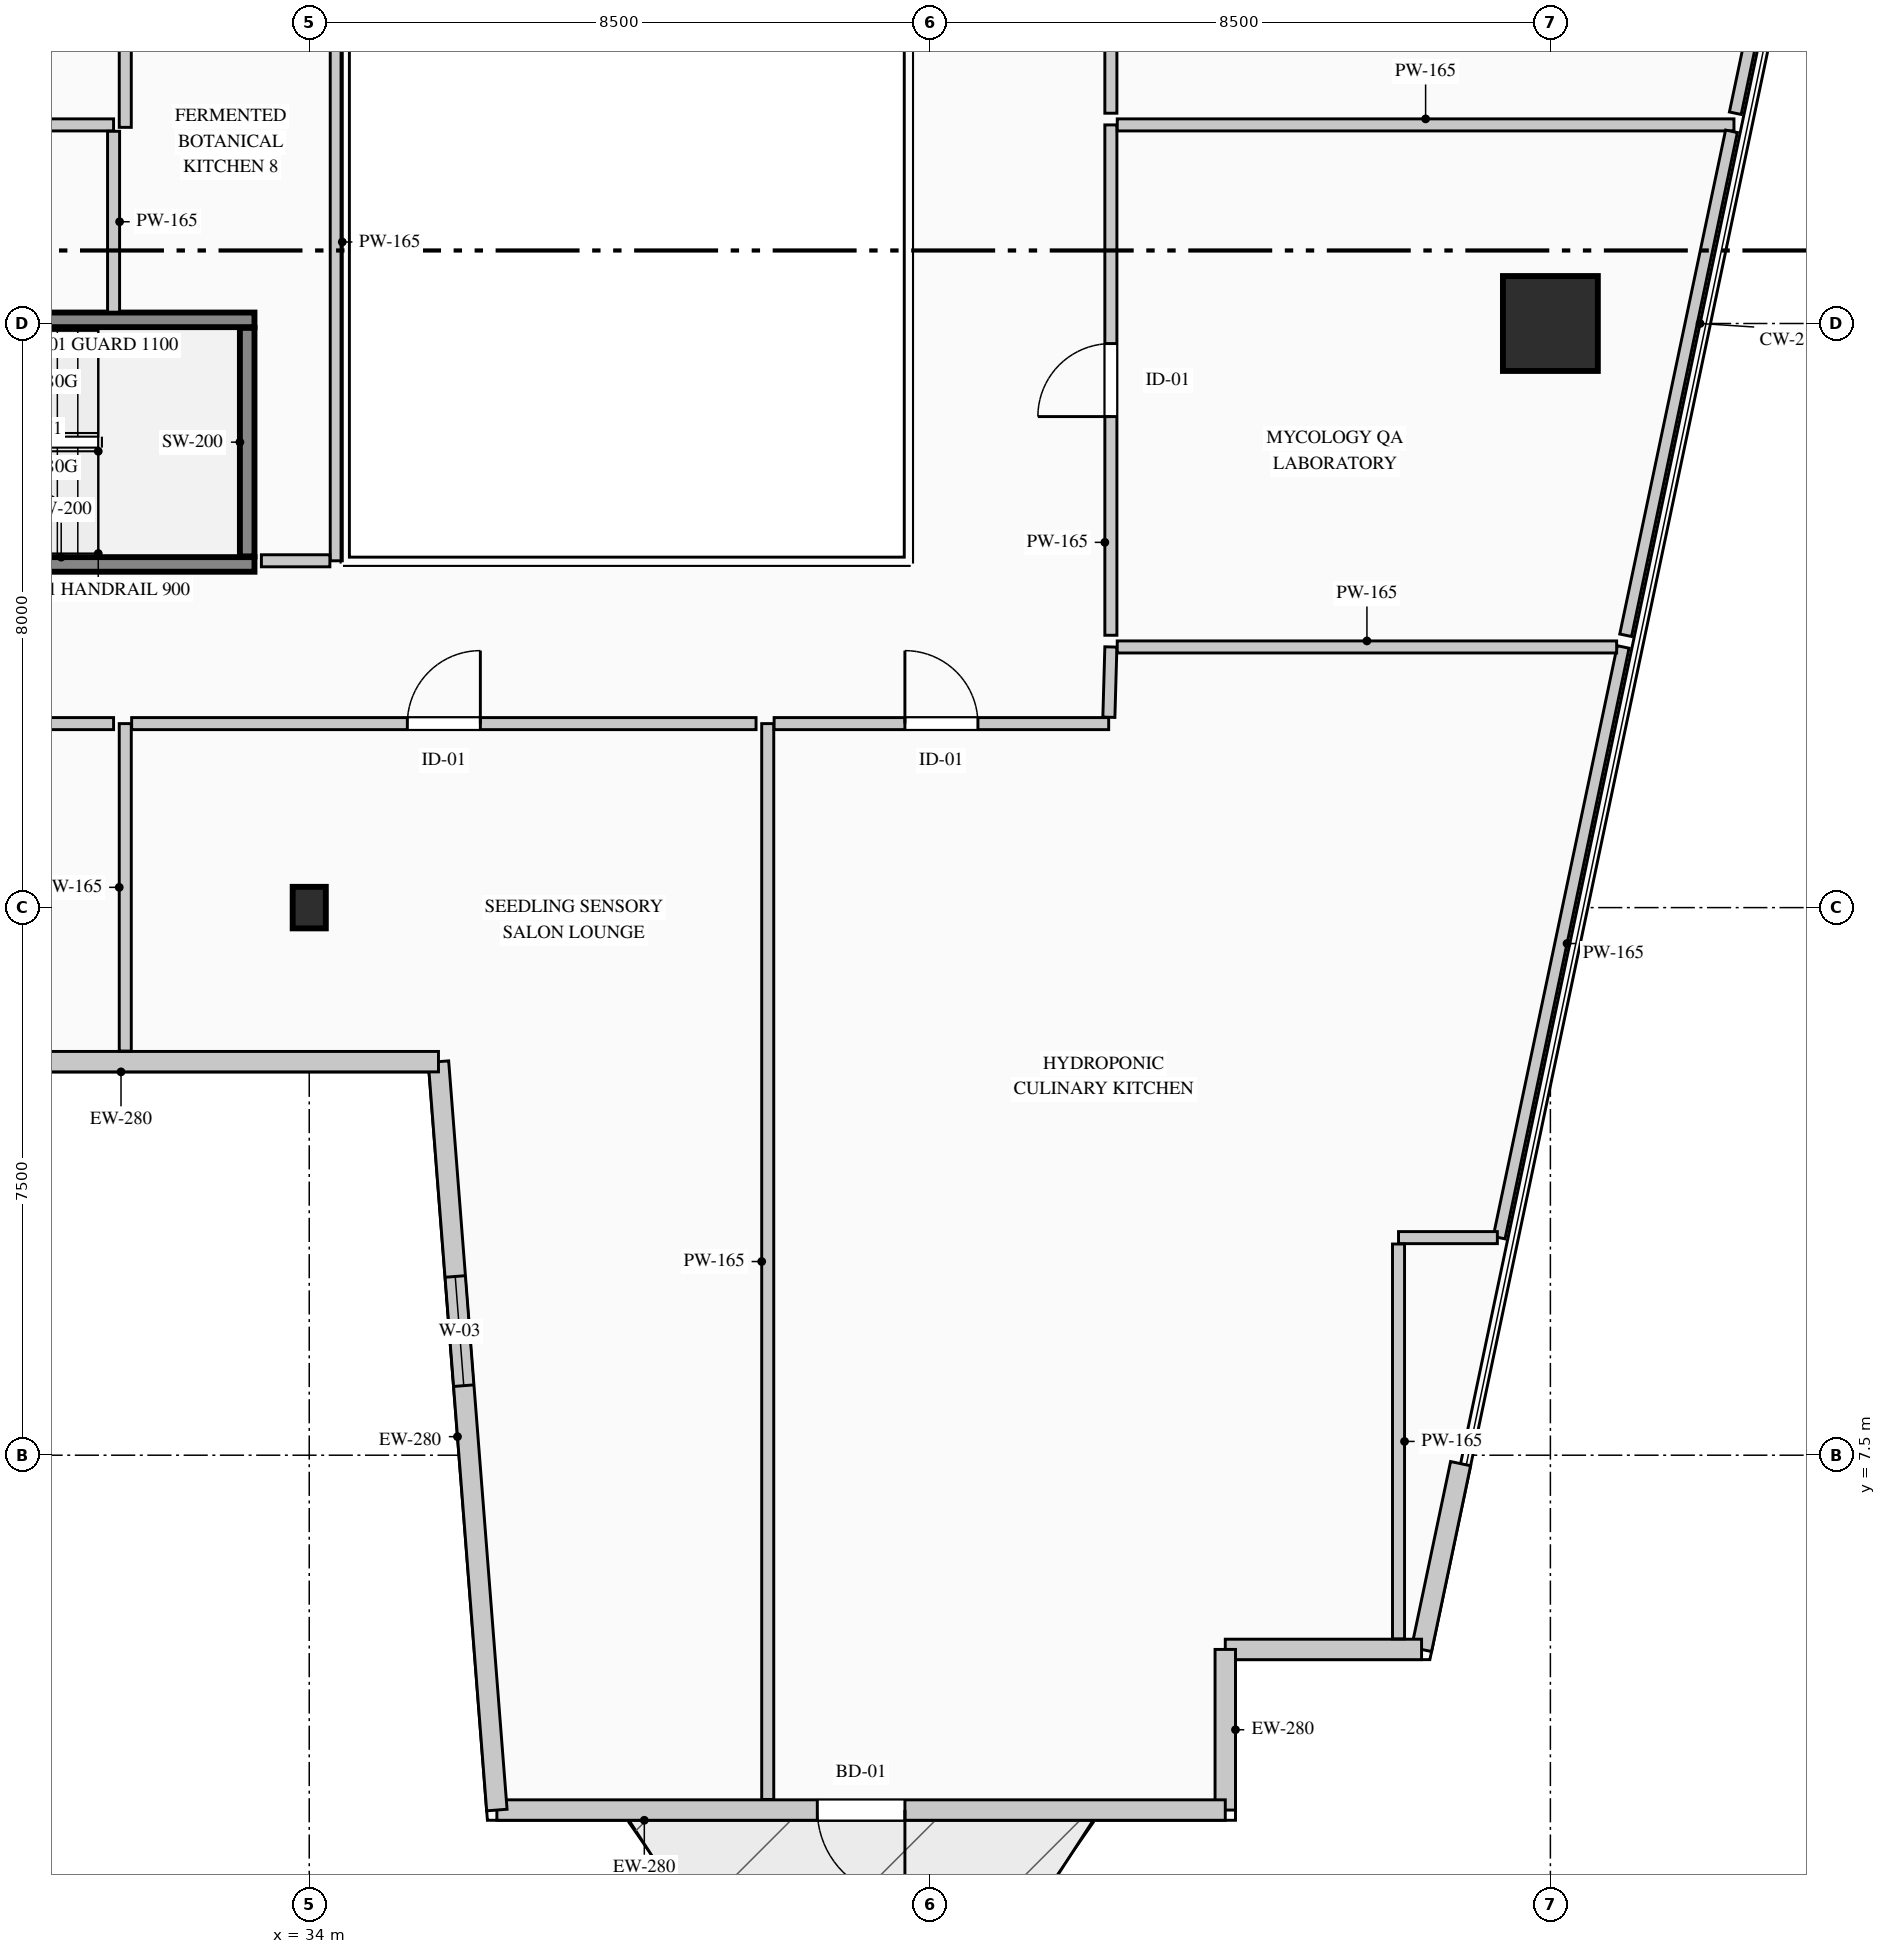
"""IFC4 building model, lengths in metres.
Left out: names, types, materials, properties, quantities, classifications, styles, units other than length and angle.
Written with IfcOpenShell. Run it as: python <this file> out.ifc"""

import sys

from ifc_helpers import new_model, si_unit, direction, frame, frame_2d, origin, origin_2d, place, context, subcontext, project, spatial, rectangle, i_section, extrude, element, fill, save


model = new_model("IFC4")
c1 = context("Model", 3, precision=1e-05, world=origin(), true_north=direction((0.0, 1.0)))
c2 = subcontext(c1, "Body", "Model", "MODEL_VIEW")
j1 = project(units=[si_unit("LENGTHUNIT", "METRE"), si_unit("PLANEANGLEUNIT", "RADIAN")], contexts=[c1])
p1 = place(None, origin())
s1 = spatial("IfcSite", under=j1, at=p1, CompositionType="ELEMENT")
p2 = place(p1, origin())
s2 = spatial("IfcBuilding", under=s1, at=p2, CompositionType="ELEMENT")
p3 = place(p2, frame((0.0, 0.0, 53.4)))
s3 = spatial("IfcBuildingStorey", under=s2, at=p3, CompositionType="ELEMENT", Elevation=53.4)
p4 = place(p3, frame((26.05, 19.7, 0.0), z_axis=(0.0, 0.0, 1.0), x_axis=(1.0, 0.0, 0.0)))
e1 = element("IfcWall", 1, at=p4, inside=s3, PredefinedType="SHEAR", context=c2, shape_type="SweptSolid", body=[
    extrude(rectangle(XDim=7.2, YDim=0.2, at=frame_2d((3.6, 0.0))), origin(), (0.0, 0.0, 1.0), 4.4),
])
p5 = place(p4, frame((0.38, 0.0, 0.0)))
e2 = element("IfcOpeningElement", 2, at=p5, cuts=e1, PredefinedType="OPENING", context=c2, shape_type="SweptSolid", body=[
    extrude(rectangle(XDim=1.15, YDim=2.2, at=frame_2d((0.575, 1.1))), frame((0.0, 0.11, 0.0), z_axis=(0.0, -1.0, 0.0), x_axis=(1.0, 0.0, 0.0)), (0.0, 0.0, 1.0), 0.22),
])
p6 = place(p3, frame((26.05, 23.05, 0.0), z_axis=(0.0, 0.0, 1.0), x_axis=(1.0, 0.0, 0.0)))
e3 = element("IfcWall", 3, at=p6, inside=s3, PredefinedType="SHEAR", context=c2, shape_type="SweptSolid", body=[
    extrude(rectangle(XDim=7.2, YDim=0.2, at=frame_2d((3.6, 0.0))), origin(), (0.0, 0.0, 1.0), 4.4),
])
p7 = place(p3, frame((33.15, 19.81, 0.0), z_axis=(0.0, 0.0, 1.0), x_axis=(0.0, 1.0, 0.0)))
e4 = element("IfcWall", 4, at=p7, inside=s3, PredefinedType="SHEAR", context=c2, shape_type="SweptSolid", body=[
    extrude(rectangle(XDim=3.13, YDim=0.2, at=frame_2d((1.565, 0.0))), origin(), (0.0, 0.0, 1.0), 4.4),
])
p8 = place(p3, frame((34.0, 15.0, 0.0), z_axis=(0.0, 0.0, 1.0), x_axis=(1.0, 0.0, 0.0)))
e5 = element("IfcColumn", 5, at=p8, inside=s3, PredefinedType="COLUMN", context=c2, shape_type="SweptSolid", body=[
    extrude(i_section(OverallWidth=0.454, OverallDepth=0.569, WebThickness=0.078, FlangeThickness=0.08, FilletRadius=0.015, at=origin_2d()), origin(), (0.0, 0.0, 1.0), 4.4),
])
p9 = place(p3, frame((51.0, 23.0, 0.0), z_axis=(0.0, 0.0, 1.0), x_axis=(1.0, 0.0, 0.0)))
e6 = element("IfcColumn", 6, at=p9, inside=s3, PredefinedType="COLUMN", context=c2, shape_type="SweptSolid", body=[
    extrude(rectangle(XDim=1.3, YDim=1.3, at=origin_2d()), origin(), (0.0, 0.0, 1.0), 4.4),
])
p10 = place(p3, frame((49.77, 7.385, 0.0), z_axis=(0.0, 0.0, 1.0), x_axis=(-0.205551409765, -0.978646319128, 0.0)))
e7 = element("IfcWall", 7, at=p10, inside=s3, PredefinedType="STANDARD", context=c2, shape_type="SweptSolid", body=[
    extrude(rectangle(XDim=2.6, YDim=0.28, at=frame_2d((1.3, 0.0))), origin(), (0.0, 0.0, 1.0), 4.1),
])
p11 = place(p3, frame((49.236, 4.84, 0.0), z_axis=(0.0, 0.0, 1.0), x_axis=(-1.0, 0.0, 0.0)))
e8 = element("IfcWall", 8, at=p11, inside=s3, PredefinedType="STANDARD", context=c2, shape_type="SweptSolid", body=[
    extrude(rectangle(XDim=2.688, YDim=0.28, at=frame_2d((1.344, 0.0))), origin(), (0.0, 0.0, 1.0), 4.1),
])
p12 = place(p3, frame((46.547, 4.84, 0.0), z_axis=(0.0, 0.0, 1.0), x_axis=(0.0, -1.0, 0.0)))
e9 = element("IfcWall", 9, at=p12, inside=s3, PredefinedType="STANDARD", context=c2, shape_type="SweptSolid", body=[
    extrude(rectangle(XDim=2.2, YDim=0.28, at=frame_2d((1.1, 0.0))), origin(), (0.0, 0.0, 1.0), 4.1),
])
p13 = place(p3, frame((46.547, 2.64, 0.0), z_axis=(0.0, 0.0, 1.0), x_axis=(-1.0, 0.0, 0.0)))
e10 = element("IfcWall", 10, at=p13, inside=s3, PredefinedType="STANDARD", context=c2, shape_type="SweptSolid", body=[
    extrude(rectangle(XDim=9.977, YDim=0.28, at=frame_2d((4.989, 0.0))), origin(), (0.0, 0.0, 1.0), 4.1),
])
p14 = place(p13, frame((4.388, 0.0, 0.0)))
e11 = element("IfcOpeningElement", 11, at=p14, cuts=e10, PredefinedType="OPENING", context=c2, shape_type="SweptSolid", body=[
    extrude(rectangle(XDim=1.2, YDim=2.2, at=frame_2d((0.6, 1.1))), frame((0.0, 0.15, 0.0), z_axis=(0.0, -1.0, 0.0), x_axis=(1.0, 0.0, 0.0)), (0.0, 0.0, 1.0), 0.3),
])
p15 = place(p3, frame((36.57, 2.64, 0.0), z_axis=(0.0, 0.0, 1.0), x_axis=(-0.077816860153, 0.996967670627, 0.0)))
e12 = element("IfcWall", 12, at=p15, inside=s3, PredefinedType="STANDARD", context=c2, shape_type="SweptSolid", body=[
    extrude(rectangle(XDim=10.281, YDim=0.28, at=frame_2d((5.141, 0.0))), origin(), (0.0, 0.0, 1.0), 4.1),
])
p16 = place(p15, frame((5.83, 0.0, 0.9)))
e13 = element("IfcOpeningElement", 13, at=p16, cuts=e12, PredefinedType="OPENING", context=c2, shape_type="SweptSolid", body=[
    extrude(rectangle(XDim=1.5, YDim=1.8, at=frame_2d((0.75, 0.9))), frame((0.0, 0.15, 0.0), z_axis=(0.0, -1.0, 0.0), x_axis=(1.0, 0.0, 0.0)), (0.0, 0.0, 1.0), 0.3),
])
p17 = place(p3, frame((35.77, 12.89, 0.0), z_axis=(0.0, 0.0, 1.0), x_axis=(-1.0, 0.0, 0.0)))
e14 = element("IfcWall", 14, at=p17, inside=s3, PredefinedType="STANDARD", context=c2, shape_type="SweptSolid", body=[
    extrude(rectangle(XDim=8.697, YDim=0.28, at=frame_2d((4.348, 0.0))), origin(), (0.0, 0.0, 1.0), 4.1),
])
p18 = place(p17, frame((5.511, 0.0, 0.9)))
e15 = element("IfcOpeningElement", 15, at=p18, cuts=e14, PredefinedType="OPENING", context=c2, shape_type="SweptSolid", body=[
    extrude(rectangle(XDim=1.5, YDim=1.8, at=frame_2d((0.75, 0.9))), frame((0.0, 0.15, 0.0), z_axis=(0.0, -1.0, 0.0), x_axis=(1.0, 0.0, 0.0)), (0.0, 0.0, 1.0), 0.3),
])
p19 = place(p3, frame((51.997, 18.57, 0.0), z_axis=(0.0, 0.0, 1.0), x_axis=(-0.205523740085, -0.978652130362, 0.0)))
e16 = element("IfcWall", 16, at=p19, inside=s3, PredefinedType="PARTITIONING", context=c2, shape_type="SweptSolid", body=[
    extrude(rectangle(XDim=8.267, YDim=0.165, at=frame_2d((4.133, 0.0))), origin(), (0.0, 0.0, 1.0), 4.1),
])
p20 = place(p3, frame((50.274, 10.48, 0.0), z_axis=(0.0, 0.0, 1.0), x_axis=(-1.0, 0.0, 0.0)))
e17 = element("IfcWall", 17, at=p20, inside=s3, PredefinedType="PARTITIONING", context=c2, shape_type="SweptSolid", body=[
    extrude(rectangle(XDim=1.354, YDim=0.165, at=frame_2d((0.677, 0.0))), origin(), (0.0, 0.0, 1.0), 4.1),
])
p21 = place(p3, frame((48.92, 10.393, 0.0), z_axis=(0.0, 0.0, 1.0), x_axis=(0.0, -1.0, 0.0)))
e18 = element("IfcWall", 18, at=p21, inside=s3, PredefinedType="PARTITIONING", context=c2, shape_type="SweptSolid", body=[
    extrude(rectangle(XDim=5.407, YDim=0.165, at=frame_2d((2.704, 0.0))), origin(), (0.0, 0.0, 1.0), 4.1),
])
p22 = place(p3, frame((40.28, 2.785, 0.0), z_axis=(0.0, 0.0, 1.0), x_axis=(0.0, 1.0, 0.0)))
e19 = element("IfcWall", 19, at=p22, inside=s3, PredefinedType="PARTITIONING", context=c2, shape_type="SweptSolid", body=[
    extrude(rectangle(XDim=14.735, YDim=0.165, at=frame_2d((7.368, 0.0))), origin(), (0.0, 0.0, 1.0), 4.1),
])
p23 = place(p3, frame((40.367, 17.52, 0.0), z_axis=(0.0, 0.0, 1.0), x_axis=(1.0, 0.0, 0.0)))
e20 = element("IfcWall", 20, at=p23, inside=s3, PredefinedType="PARTITIONING", context=c2, shape_type="SweptSolid", body=[
    extrude(rectangle(XDim=4.583, YDim=0.165, at=frame_2d((2.291, 0.0))), origin(), (0.0, 0.0, 1.0), 4.1),
])
p24 = place(p23, frame((1.791, 0.0, 0.0)))
e21 = element("IfcOpeningElement", 21, at=p24, cuts=e20, PredefinedType="OPENING", context=c2, shape_type="SweptSolid", body=[
    extrude(rectangle(XDim=1.0, YDim=2.15, at=frame_2d((0.5, 1.075))), frame((0.0, 0.093, 0.0), z_axis=(0.0, -1.0, 0.0), x_axis=(1.0, 0.0, 0.0)), (0.0, 0.0, 1.0), 0.185),
])
p25 = place(p3, frame((44.952, 17.607, 0.0), z_axis=(0.0, 0.0, 1.0), x_axis=(0.028624859452, 0.999590224753, 0.0)))
e22 = element("IfcWall", 22, at=p25, inside=s3, PredefinedType="PARTITIONING", context=c2, shape_type="SweptSolid", body=[
    extrude(rectangle(XDim=0.964, YDim=0.165, at=frame_2d((0.482, 0.0))), origin(), (0.0, 0.0, 1.0), 4.1),
])
p26 = place(p3, frame((45.067, 18.57, 0.0), z_axis=(0.0, 0.0, 1.0), x_axis=(1.0, 0.0, 0.0)))
e23 = element("IfcWall", 23, at=p26, inside=s3, PredefinedType="PARTITIONING", context=c2, shape_type="SweptSolid", body=[
    extrude(rectangle(XDim=6.841, YDim=0.165, at=frame_2d((3.42, 0.0))), origin(), (0.0, 0.0, 1.0), 4.1),
])
p27 = place(p3, frame((31.48, 13.035, 0.0), z_axis=(0.0, 0.0, 1.0), x_axis=(0.0, 1.0, 0.0)))
e24 = element("IfcWall", 24, at=p27, inside=s3, PredefinedType="PARTITIONING", context=c2, shape_type="SweptSolid", body=[
    extrude(rectangle(XDim=4.485, YDim=0.165, at=frame_2d((2.243, 0.0))), origin(), (0.0, 0.0, 1.0), 4.1),
])
p28 = place(p3, frame((31.567, 17.52, 0.0), z_axis=(0.0, 0.0, 1.0), x_axis=(1.0, 0.0, 0.0)))
e25 = element("IfcWall", 25, at=p28, inside=s3, PredefinedType="PARTITIONING", context=c2, shape_type="SweptSolid", body=[
    extrude(rectangle(XDim=8.553, YDim=0.165, at=frame_2d((4.276, 0.0))), origin(), (0.0, 0.0, 1.0), 3.685),
])
p29 = place(p28, frame((3.776, 0.0, 0.0)))
e26 = element("IfcOpeningElement", 26, at=p29, cuts=e25, PredefinedType="OPENING", context=c2, shape_type="SweptSolid", body=[
    extrude(rectangle(XDim=1.0, YDim=2.15, at=frame_2d((0.5, 1.075))), frame((0.0, 0.093, 0.0), z_axis=(0.0, -1.0, 0.0), x_axis=(1.0, 0.0, 0.0)), (0.0, 0.0, 1.0), 0.185),
])
p30 = place(p3, frame((22.68, 17.52, 0.0), z_axis=(0.0, 0.0, 1.0), x_axis=(1.0, 0.0, 0.0)))
e27 = element("IfcWall", 27, at=p30, inside=s3, PredefinedType="PARTITIONING", context=c2, shape_type="SweptSolid", body=[
    extrude(rectangle(XDim=8.64, YDim=0.165, at=frame_2d((4.32, 0.0))), origin(), (0.0, 0.0, 1.0), 3.685),
])
p31 = place(p30, frame((3.82, 0.0, 0.0)))
e28 = element("IfcOpeningElement", 28, at=p31, cuts=e27, PredefinedType="OPENING", context=c2, shape_type="SweptSolid", body=[
    extrude(rectangle(XDim=1.0, YDim=2.15, at=frame_2d((0.5, 1.075))), frame((0.0, 0.093, 0.0), z_axis=(0.0, -1.0, 0.0), x_axis=(1.0, 0.0, 0.0)), (0.0, 0.0, 1.0), 0.185),
])
p32 = place(p3, frame((44.98, 18.73, 0.0), z_axis=(0.0, 0.0, 1.0), x_axis=(0.0, 1.0, 0.0)))
e29 = element("IfcWall", 29, at=p32, inside=s3, PredefinedType="PARTITIONING", context=c2, shape_type="SweptSolid", body=[
    extrude(rectangle(XDim=6.99, YDim=0.165, at=frame_2d((3.495, 0.0))), origin(), (0.0, 0.0, 1.0), 4.1),
])
p33 = place(p32, frame((2.995, 0.0, 0.0)))
e30 = element("IfcOpeningElement", 30, at=p33, cuts=e29, PredefinedType="OPENING", context=c2, shape_type="SweptSolid", body=[
    extrude(rectangle(XDim=1.0, YDim=2.15, at=frame_2d((0.5, 1.075))), frame((0.0, 0.093, 0.0), z_axis=(0.0, -1.0, 0.0), x_axis=(1.0, 0.0, 0.0)), (0.0, 0.0, 1.0), 0.185),
])
p34 = place(p3, frame((45.067, 25.72, 0.0), z_axis=(0.0, 0.0, 1.0), x_axis=(1.0, 0.0, 0.0)))
e31 = element("IfcWall", 31, at=p34, inside=s3, PredefinedType="PARTITIONING", context=c2, shape_type="SweptSolid", body=[
    extrude(rectangle(XDim=8.447, YDim=0.165, at=frame_2d((4.224, 0.0))), origin(), (0.0, 0.0, 1.0), 4.1),
])
p35 = place(p3, frame((53.481, 25.633, 0.0), z_axis=(0.0, 0.0, 1.0), x_axis=(-0.205539446235, -0.97864883183, 0.0)))
e32 = element("IfcWall", 32, at=p35, inside=s3, PredefinedType="PARTITIONING", context=c2, shape_type="SweptSolid", body=[
    extrude(rectangle(XDim=7.053, YDim=0.165, at=frame_2d((3.527, 0.0))), origin(), (0.0, 0.0, 1.0), 4.1),
])
p36 = place(p3, frame((22.91, 25.72, 0.0), z_axis=(0.0, 0.0, 1.0), x_axis=(1.0, 0.0, 0.0)))
e33 = element("IfcWall", 33, at=p36, inside=s3, PredefinedType="PARTITIONING", context=c2, shape_type="SweptSolid", body=[
    extrude(rectangle(XDim=8.41, YDim=0.165, at=frame_2d((4.205, 0.0))), origin(), (0.0, 0.0, 1.0), 3.685),
])
p37 = place(p3, frame((31.32, 25.633, 0.0), z_axis=(0.0, 0.0, 1.0), x_axis=(0.0, -1.0, 0.0)))
e34 = element("IfcWall", 34, at=p37, inside=s3, PredefinedType="PARTITIONING", context=c2, shape_type="SweptSolid", body=[
    extrude(rectangle(XDim=2.478, YDim=0.165, at=frame_2d((1.239, 0.0))), origin(), (0.0, 0.0, 1.0), 4.1),
])
p38 = place(p3, frame((34.37, 28.482, 0.0), z_axis=(0.0, 0.0, 1.0), x_axis=(0.0, -1.0, 0.0)))
e35 = element("IfcWall", 35, at=p38, inside=s3, PredefinedType="PARTITIONING", context=c2, shape_type="SweptSolid", body=[
    extrude(rectangle(XDim=8.732, YDim=0.165, at=frame_2d((4.366, 0.0))), origin(), (0.0, 0.0, 1.0), 4.1),
])
p39 = place(p3, frame((34.282, 19.75, 0.0), z_axis=(0.0, 0.0, 1.0), x_axis=(-1.0, 0.0, 0.0)))
e36 = element("IfcWall", 36, at=p39, inside=s3, PredefinedType="PARTITIONING", context=c2, shape_type="SweptSolid", body=[
    extrude(rectangle(XDim=0.938, YDim=0.165, at=frame_2d((0.469, 0.0))), origin(), (0.0, 0.0, 1.0), 4.1),
])
p40 = place(p3, frame((31.48, 25.686, 0.0), z_axis=(0.0, 0.0, 1.0), x_axis=(0.0, 1.0, 0.0)))
e37 = element("IfcWall", 37, at=p40, inside=s3, PredefinedType="PARTITIONING", context=c2, shape_type="SweptSolid", body=[
    extrude(rectangle(XDim=2.796, YDim=0.165, at=frame_2d((1.398, 0.0))), origin(), (0.0, 0.0, 1.0), 4.1),
])
p41 = place(p3, frame((56.194, 38.548, 0.0), z_axis=(0.0, 0.0, 1.0), x_axis=(-0.205602677483, -0.978635549636, 0.0)))
e38 = element("IfcWall", 38, at=p41, inside=s3, PredefinedType="PARTITIONING", context=c2, shape_type="SweptSolid", body=[
    extrude(rectangle(XDim=12.944, YDim=0.165, at=frame_2d((6.472, 0.0))), origin(), (0.0, 0.0, 1.0), 4.1),
])
p42 = place(p3, frame((44.98, 25.88, 0.0), z_axis=(0.0, 0.0, 1.0), x_axis=(0.0, 1.0, 0.0)))
e39 = element("IfcWall", 39, at=p42, inside=s3, PredefinedType="PARTITIONING", context=c2, shape_type="SweptSolid", body=[
    extrude(rectangle(XDim=8.15, YDim=0.165, at=frame_2d((4.075, 0.0))), origin(), (0.0, 0.0, 1.0), 3.685),
])
p43 = place(p42, frame((3.575, 0.0, 0.0)))
e40 = element("IfcOpeningElement", 40, at=p43, cuts=e39, PredefinedType="OPENING", context=c2, shape_type="SweptSolid", body=[
    extrude(rectangle(XDim=1.0, YDim=2.15, at=frame_2d((0.5, 1.075))), frame((0.0, 0.093, 0.0), z_axis=(0.0, -1.0, 0.0), x_axis=(1.0, 0.0, 0.0)), (0.0, 0.0, 1.0), 0.185),
])
p44 = place(p14, origin())
e41 = element("IfcDoor", 41, at=p44, inside=s3, OperationType="SINGLE_SWING_LEFT", PredefinedType="DOOR", context=c2, shape_type="SweptSolid", body=[
    extrude(rectangle(XDim=1.2, YDim=2.2, at=frame_2d((0.6, 1.1))), frame((0.0, 0.025, 0.0), z_axis=(0.0, -1.0, 0.0), x_axis=(1.0, 0.0, 0.0)), (0.0, 0.0, 1.0), 0.05),
])
fill(e11, e41)
p45 = place(p16, origin())
e42 = element("IfcWindow", 42, at=p45, inside=s3, PartitioningType="SINGLE_PANEL", PredefinedType="WINDOW", context=c2, shape_type="SweptSolid", body=[
    extrude(rectangle(XDim=1.5, YDim=1.8, at=frame_2d((0.75, 0.9))), frame((0.0, 0.03, 0.0), z_axis=(0.0, -1.0, 0.0), x_axis=(1.0, 0.0, 0.0)), (0.0, 0.0, 1.0), 0.06),
])
fill(e13, e42)
p46 = place(p24, origin())
e43 = element("IfcDoor", 43, at=p46, inside=s3, OperationType="SINGLE_SWING_LEFT", PredefinedType="DOOR", context=c2, shape_type="SweptSolid", body=[
    extrude(rectangle(XDim=1.0, YDim=2.15, at=frame_2d((0.5, 1.075))), frame((0.0, 0.025, 0.0), z_axis=(0.0, -1.0, 0.0), x_axis=(1.0, 0.0, 0.0)), (0.0, 0.0, 1.0), 0.05),
])
fill(e21, e43)
p47 = place(p29, origin())
e44 = element("IfcDoor", 44, at=p47, inside=s3, OperationType="SINGLE_SWING_RIGHT", PredefinedType="DOOR", context=c2, shape_type="SweptSolid", body=[
    extrude(rectangle(XDim=1.0, YDim=2.15, at=frame_2d((0.5, 1.075))), frame((0.0, 0.025, 0.0), z_axis=(0.0, -1.0, 0.0), x_axis=(1.0, 0.0, 0.0)), (0.0, 0.0, 1.0), 0.05),
])
fill(e26, e44)
p48 = place(p33, origin())
e45 = element("IfcDoor", 45, at=p48, inside=s3, OperationType="SINGLE_SWING_LEFT", PredefinedType="DOOR", context=c2, shape_type="SweptSolid", body=[
    extrude(rectangle(XDim=1.0, YDim=2.15, at=frame_2d((0.5, 1.075))), frame((0.0, 0.025, 0.0), z_axis=(0.0, -1.0, 0.0), x_axis=(1.0, 0.0, 0.0)), (0.0, 0.0, 1.0), 0.05),
])
fill(e30, e45)
save(model, sys.argv[1])
